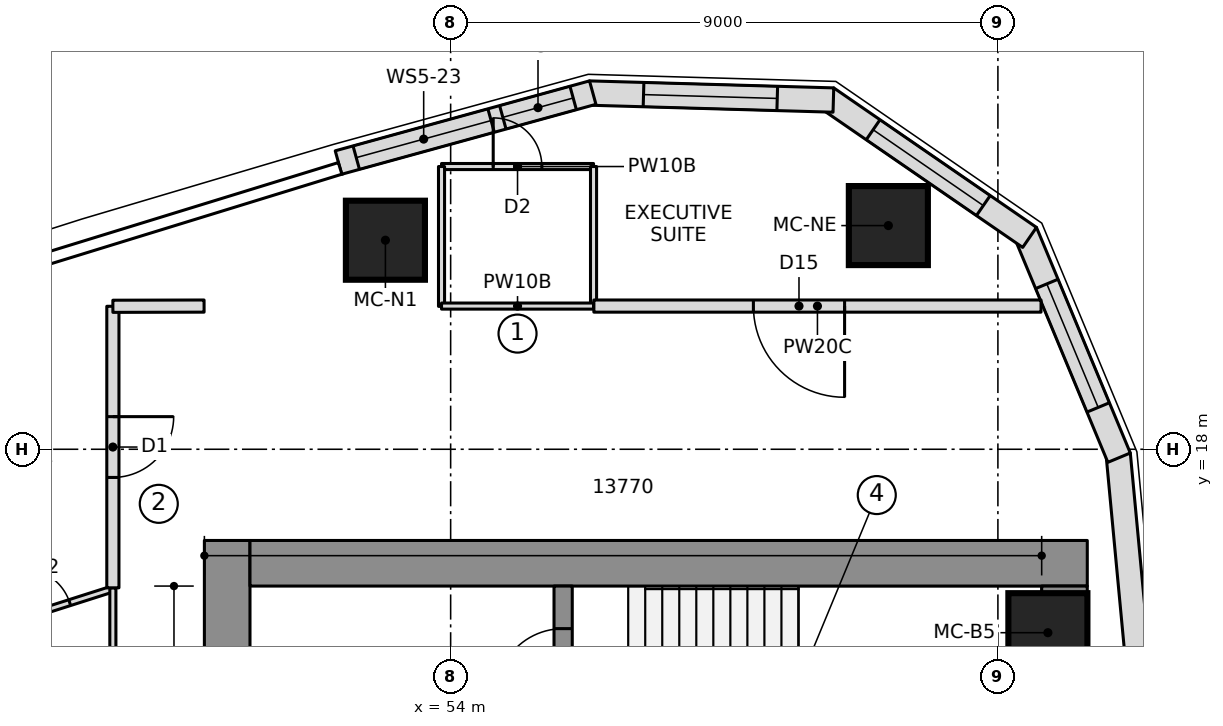
"""IFC4 building model, lengths in metres.
Left out: names, types, materials, properties, quantities, classifications, styles, units other than length and angle.
Written with IfcOpenShell. Run it as: python <this file> out.ifc"""

import sys

from ifc_helpers import new_model, si_unit, direction, frame, frame_2d, origin, origin_2d, place, context, subcontext, project, spatial, polyline, rectangle, outline, extrude, element, fill, save


model = new_model("IFC4")
c1 = context("Model", 3, precision=1e-05, world=origin(), true_north=direction((0.0, 1.0)))
c2 = subcontext(c1, "Body", "Model", "MODEL_VIEW")
j1 = project(units=[si_unit("LENGTHUNIT", "METRE"), si_unit("PLANEANGLEUNIT", "RADIAN")], contexts=[c1])
p1 = place(None, origin())
s1 = spatial("IfcSite", under=j1, at=p1, CompositionType="ELEMENT")
p2 = place(p1, origin())
s2 = spatial("IfcBuilding", under=s1, at=p2, CompositionType="ELEMENT")
p3 = place(p2, frame((0.0, 0.0, 175.5)))
s3 = spatial("IfcBuildingStorey", under=s2, at=p3, CompositionType="ELEMENT", Elevation=175.5)
p4 = place(p3, frame((50.325, 6.65, 0.0), z_axis=(0.0, 0.0, 1.0), x_axis=(0.0, 1.0, 0.0)))
e1 = element("IfcWall", 1, at=p4, inside=s3, PredefinedType="SHEAR", context=c2, shape_type="SweptSolid", body=[
    extrude(rectangle(XDim=9.85, YDim=0.75, at=frame_2d((4.925, 0.0))), origin(), (0.0, 0.0, 1.0), 3.55),
])
p5 = place(p4, frame((6.5, 0.0, 0.0)))
e2 = element("IfcOpeningElement", 2, at=p5, cuts=e1, PredefinedType="OPENING", context=c2, shape_type="SweptSolid", body=[
    extrude(rectangle(XDim=1.1, YDim=2.1, at=frame_2d((0.55, 1.05))), frame((0.0, 0.385, 0.0), z_axis=(0.0, -1.0, 0.0), x_axis=(1.0, 0.0, 0.0)), (0.0, 0.0, 1.0), 0.77),
])
p6 = place(p3, frame((50.7, 16.125, 0.0), z_axis=(0.0, 0.0, 1.0), x_axis=(1.0, 0.0, 0.0)))
e3 = element("IfcWall", 3, at=p6, inside=s3, PredefinedType="SHEAR", context=c2, shape_type="SweptSolid", body=[
    extrude(rectangle(XDim=13.77, YDim=0.75, at=frame_2d((6.885, 0.0))), origin(), (0.0, 0.0, 1.0), 3.55),
])
p7 = place(p3, frame((64.095, 8.099, 0.0), z_axis=(0.0, 0.0, 1.0), x_axis=(0.0, 1.0, 0.0)))
e4 = element("IfcWall", 4, at=p7, inside=s3, PredefinedType="SHEAR", context=c2, shape_type="SweptSolid", body=[
    extrude(rectangle(XDim=7.651, YDim=0.75, at=frame_2d((3.825, 0.0))), origin(), (0.0, 0.0, 1.0), 3.55),
])
p8 = place(p3, frame((55.85, 10.35, 0.0), z_axis=(0.0, 0.0, 1.0), x_axis=(0.0, 1.0, 0.0)))
e5 = element("IfcWall", 5, at=p8, inside=s3, PredefinedType="SHEAR", context=c2, shape_type="SweptSolid", body=[
    extrude(rectangle(XDim=5.4, YDim=0.3, at=frame_2d((2.7, 0.0))), origin(), (0.0, 0.0, 1.0), 3.55),
])
p9 = place(p8, frame((1.43, 0.0, 0.0)))
e6 = element("IfcOpeningElement", 6, at=p9, cuts=e5, PredefinedType="OPENING", context=c2, shape_type="SweptSolid", body=[
    extrude(rectangle(XDim=1.1, YDim=2.1, at=frame_2d((0.55, 1.05))), frame((0.0, 0.16, 0.0), z_axis=(0.0, -1.0, 0.0), x_axis=(1.0, 0.0, 0.0)), (0.0, 0.0, 1.0), 0.32),
])
p10 = place(p8, frame((3.6, 0.0, 0.0)))
e7 = element("IfcOpeningElement", 7, at=p10, cuts=e5, PredefinedType="OPENING", context=c2, shape_type="SweptSolid", body=[
    extrude(rectangle(XDim=1.1, YDim=2.1, at=frame_2d((0.55, 1.05))), frame((0.0, 0.16, 0.0), z_axis=(0.0, -1.0, 0.0), x_axis=(1.0, 0.0, 0.0)), (0.0, 0.0, 1.0), 0.32),
])
for number, where, z_axis, x_axis in (
    (8, (63.822, 14.983, 0.0), (0.0, 0.0, 1.0), (1.0, 0.0, 0.0)),
    (9, (61.198, 21.679, 0.0), (0.0, 0.0, 1.0), (1.0, 0.0, 0.0)),
    (10, (52.927, 21.438, 0.0), (0.0, 0.0, 1.0), (1.0, 0.0, 0.0)),
):
    element("IfcColumn", number, at=place(p3, frame(where, z_axis=z_axis, x_axis=x_axis)), inside=s3, PredefinedType="COLUMN", context=c2, shape_type="SweptSolid", body=[
        extrude(rectangle(XDim=1.3, YDim=1.3, at=origin_2d()), origin(), (0.0, 0.0, 1.0), 3.55),
    ])
p11 = place(p3, frame((65.401, 13.429, 0.0), z_axis=(0.0, 0.0, 1.0), x_axis=(-0.093605694738, 0.995609348044, 0.0)))
e11 = element("IfcWall", 11, at=p11, inside=s3, PredefinedType="NOTDEFINED", context=c2, shape_type="SweptSolid", body=[
    extrude(outline(polyline([(-0.003, -0.2), (4.511, -0.2), (4.451, 0.2), (0.003, 0.2), (-0.003, -0.2)])), origin(), (0.0, 0.0, 1.0), 3.25),
])
p12 = place(p3, frame((64.981, 17.89, 0.0), z_axis=(0.0, 0.0, 1.0), x_axis=(-0.383997619794, 0.923334082547, 0.0)))
e12 = element("IfcWall", 12, at=p12, inside=s3, PredefinedType="NOTDEFINED", context=c2, shape_type="SweptSolid", body=[
    extrude(outline(polyline([(-0.03, -0.2), (3.988, -0.2), (3.87, 0.2), (0.03, 0.2), (-0.03, -0.2)])), origin(), (0.0, 0.0, 1.0), 3.25),
])
p13 = place(p12, frame((0.865, 0.0, 0.6)))
e13 = element("IfcOpeningElement", 13, at=p13, cuts=e12, PredefinedType="OPENING", context=c2, shape_type="SweptSolid", body=[
    extrude(outline(polyline([(0.0, 1.35), (0.084, 1.771), (0.322, 2.128), (0.679, 2.366), (1.1, 2.45), (1.521, 2.366), (1.878, 2.128), (2.116, 1.771), (2.2, 1.35), (2.2, 1.1), (2.116, 0.679), (1.878, 0.322), (1.521, 0.084), (1.1, 0.0), (0.679, 0.084), (0.322, 0.322), (0.084, 0.679), (0.0, 1.1), (0.0, 1.35)])), frame((0.0, 0.21, 0.0), z_axis=(0.0, -1.0, 0.0), x_axis=(1.0, 0.0, 0.0)), (0.0, 0.0, 1.0), 0.42),
])
p14 = place(p3, frame((63.472, 21.518, 0.0), z_axis=(0.0, 0.0, 1.0), x_axis=(-0.823806162588, 0.566871596115, 0.0)))
e14 = element("IfcWall", 14, at=p14, inside=s3, PredefinedType="NOTDEFINED", context=c2, shape_type="SweptSolid", body=[
    extrude(outline(polyline([(-0.059, -0.2), (3.988, -0.2), (3.87, 0.2), (0.059, 0.2), (-0.059, -0.2)])), origin(), (0.0, 0.0, 1.0), 3.25),
])
p15 = place(p14, frame((0.865, 0.0, 0.6)))
e15 = element("IfcOpeningElement", 15, at=p15, cuts=e14, PredefinedType="OPENING", context=c2, shape_type="SweptSolid", body=[
    extrude(outline(polyline([(0.0, 1.35), (0.084, 1.771), (0.322, 2.128), (0.679, 2.366), (1.1, 2.45), (1.521, 2.366), (1.878, 2.128), (2.116, 1.771), (2.2, 1.35), (2.2, 1.1), (2.116, 0.679), (1.878, 0.322), (1.521, 0.084), (1.1, 0.0), (0.679, 0.084), (0.322, 0.322), (0.084, 0.679), (0.0, 1.1), (0.0, 1.35)])), frame((0.0, 0.21, 0.0), z_axis=(0.0, -1.0, 0.0), x_axis=(1.0, 0.0, 0.0)), (0.0, 0.0, 1.0), 0.42),
])
p16 = place(p3, frame((60.236, 23.745, 0.0), z_axis=(0.0, 0.0, 1.0), x_axis=(-0.999587920197, 0.028705222472, 0.0)))
e16 = element("IfcWall", 16, at=p16, inside=s3, PredefinedType="NOTDEFINED", context=c2, shape_type="SweptSolid", body=[
    extrude(outline(polyline([(-0.059, -0.2), (3.959, -0.2), (3.9, 0.2), (0.059, 0.2), (-0.059, -0.2)])), origin(), (0.0, 0.0, 1.0), 3.25),
])
p17 = place(p16, frame((0.865, 0.0, 0.6)))
e17 = element("IfcOpeningElement", 17, at=p17, cuts=e16, PredefinedType="OPENING", context=c2, shape_type="SweptSolid", body=[
    extrude(outline(polyline([(0.0, 1.35), (0.084, 1.771), (0.322, 2.128), (0.679, 2.366), (1.1, 2.45), (1.521, 2.366), (1.878, 2.128), (2.116, 1.771), (2.2, 1.35), (2.2, 1.1), (2.116, 0.679), (1.878, 0.322), (1.521, 0.084), (1.1, 0.0), (0.679, 0.084), (0.322, 0.322), (0.084, 0.679), (0.0, 1.1), (0.0, 1.35)])), frame((0.0, 0.21, 0.0), z_axis=(0.0, -1.0, 0.0), x_axis=(1.0, 0.0, 0.0)), (0.0, 0.0, 1.0), 0.42),
])
p18 = place(p3, frame((56.308, 23.858, 0.0), z_axis=(0.0, 0.0, 1.0), x_axis=(-0.964205755089, -0.265155165617, 0.0)))
e18 = element("IfcWall", 18, at=p18, inside=s3, PredefinedType="NOTDEFINED", context=c2, shape_type="SweptSolid", body=[
    extrude(outline(polyline([(-0.03, -0.2), (4.307, -0.2), (4.307, 0.2), (0.03, 0.2), (-0.03, -0.2)])), origin(), (0.0, 0.0, 1.0), 3.25),
])
p19 = place(p18, frame((0.303, 0.0, 0.9)))
e19 = element("IfcOpeningElement", 19, at=p19, cuts=e18, PredefinedType="OPENING", context=c2, shape_type="SweptSolid", body=[
    extrude(rectangle(XDim=1.2, YDim=1.8, at=frame_2d((0.6, 0.9))), frame((0.0, 0.21, 0.0), z_axis=(0.0, -1.0, 0.0), x_axis=(1.0, 0.0, 0.0)), (0.0, 0.0, 1.0), 0.42),
])
p20 = place(p18, frame((1.704, 0.0, 0.9)))
e20 = element("IfcOpeningElement", 20, at=p20, cuts=e18, PredefinedType="OPENING", context=c2, shape_type="SweptSolid", body=[
    extrude(rectangle(XDim=2.3, YDim=1.8, at=frame_2d((1.15, 0.9))), frame((0.0, 0.21, 0.0), z_axis=(0.0, -1.0, 0.0), x_axis=(1.0, 0.0, 0.0)), (0.0, 0.0, 1.0), 0.42),
])
p21 = place(p3, frame((53.85, 22.65, 0.0), z_axis=(0.0, 0.0, 1.0), x_axis=(1.0, 0.0, 0.0)))
e21 = element("IfcWall", 21, at=p21, inside=s3, PredefinedType="PARTITIONING", context=c2, shape_type="SweptSolid", body=[
    extrude(rectangle(XDim=2.5, YDim=0.1, at=frame_2d((1.25, 0.0))), origin(), (0.0, 0.0, 1.0), 3.25),
])
p22 = place(p21, frame((0.85, 0.0, 0.0)))
e22 = element("IfcOpeningElement", 22, at=p22, cuts=e21, PredefinedType="OPENING", context=c2, shape_type="SweptSolid", body=[
    extrude(rectangle(XDim=0.8, YDim=2.1, at=frame_2d((0.4, 1.05))), frame((0.0, 0.06, 0.0), z_axis=(0.0, -1.0, 0.0), x_axis=(1.0, 0.0, 0.0)), (0.0, 0.0, 1.0), 0.12),
])
for number, where, z_axis, x_axis in (
    (23, (56.35, 22.65, 0.0), (0.0, 0.0, 1.0), (0.0, -1.0, 0.0)),
    (24, (53.85, 20.35, 0.0), (0.0, 0.0, 1.0), (0.0, 1.0, 0.0)),
):
    element("IfcWall", number, at=place(p3, frame(where, z_axis=z_axis, x_axis=x_axis)), inside=s3, PredefinedType="PARTITIONING", context=c2, shape_type="SweptSolid", body=[
        extrude(rectangle(XDim=2.3, YDim=0.1, at=frame_2d((1.15, 0.0))), origin(), (0.0, 0.0, 1.0), 3.25),
    ])
p23 = place(p3, frame((46.259, 15.007, 0.0), z_axis=(0.0, 0.0, 1.0), x_axis=(0.952731222045, 0.303814447552, 0.0)))
e25 = element("IfcWall", 25, at=p23, inside=s3, PredefinedType="PARTITIONING", context=c2, shape_type="SweptSolid", body=[
    extrude(rectangle(XDim=2.277, YDim=0.1, at=frame_2d((1.138, 0.0))), origin(), (0.0, 0.0, 1.0), 3.25),
])
p24 = place(p23, frame((0.75, 0.0, 0.0)))
e26 = element("IfcOpeningElement", 26, at=p24, cuts=e25, PredefinedType="OPENING", context=c2, shape_type="SweptSolid", body=[
    extrude(rectangle(XDim=0.8, YDim=2.1, at=frame_2d((0.4, 1.05))), frame((0.0, 0.06, 0.0), z_axis=(0.0, -1.0, 0.0), x_axis=(1.0, 0.0, 0.0)), (0.0, 0.0, 1.0), 0.12),
])
p25 = place(p3, frame((63.709, 20.355, 0.0), z_axis=(0.0, 0.0, 1.0), x_axis=(-1.0, 0.0, 0.0)))
e27 = element("IfcWall", 27, at=p25, inside=s3, PredefinedType="PARTITIONING", context=c2, shape_type="SweptSolid", body=[
    extrude(rectangle(XDim=7.354, YDim=0.2, at=frame_2d((3.677, 0.0))), origin(), (0.0, 0.0, 1.0), 3.25),
])
p26 = place(p25, frame((3.231, 0.0, 0.0)))
e28 = element("IfcOpeningElement", 28, at=p26, cuts=e27, PredefinedType="OPENING", context=c2, shape_type="SweptSolid", body=[
    extrude(rectangle(XDim=1.5, YDim=2.1, at=frame_2d((0.75, 1.05))), frame((0.0, 0.11, 0.0), z_axis=(0.0, -1.0, 0.0), x_axis=(1.0, 0.0, 0.0)), (0.0, 0.0, 1.0), 0.22),
])
p27 = place(p3, frame((56.35, 20.355, 0.0), z_axis=(0.0, 0.0, 1.0), x_axis=(-1.0, 0.0, 0.0)))
e29 = element("IfcWall", 29, at=p27, inside=s3, PredefinedType="PARTITIONING", context=c2, shape_type="SweptSolid", body=[
    extrude(rectangle(XDim=2.5, YDim=0.1, at=frame_2d((1.25, 0.0))), origin(), (0.0, 0.0, 1.0), 3.25),
])
p28 = place(p3, frame((48.445, 15.721, 0.0), z_axis=(0.0, 0.0, 1.0), x_axis=(0.0, -1.0, 0.0)))
e30 = element("IfcWall", 30, at=p28, inside=s3, PredefinedType="PARTITIONING", context=c2, shape_type="SweptSolid", body=[
    extrude(rectangle(XDim=2.426, YDim=0.1, at=frame_2d((1.213, 0.0))), origin(), (0.0, 0.0, 1.0), 3.25),
])
p29 = place(p3, frame((48.445, 20.352, 0.0), z_axis=(0.0, 0.0, 1.0), x_axis=(-5.2725931e-05, -0.99999999861, 0.0)))
e31 = element("IfcWall", 31, at=p29, inside=s3, PredefinedType="PARTITIONING", context=c2, shape_type="SweptSolid", body=[
    extrude(rectangle(XDim=4.63, YDim=0.2, at=frame_2d((2.315, 0.0))), origin(), (0.0, 0.0, 1.0), 3.25),
])
p30 = place(p29, frame((1.815, 0.0, 0.0)))
e32 = element("IfcOpeningElement", 32, at=p30, cuts=e31, PredefinedType="OPENING", context=c2, shape_type="SweptSolid", body=[
    extrude(rectangle(XDim=1.0, YDim=2.1, at=frame_2d((0.5, 1.05))), frame((0.0, 0.11, 0.0), z_axis=(0.0, -1.0, 0.0), x_axis=(1.0, 0.0, 0.0)), (0.0, 0.0, 1.0), 0.22),
])
p31 = place(p3, frame((49.945, 20.355, 0.0), z_axis=(0.0, 0.0, 1.0), x_axis=(-0.999997403051, -0.002279010849, 0.0)))
e33 = element("IfcWall", 33, at=p31, inside=s3, PredefinedType="PARTITIONING", context=c2, shape_type="SweptSolid", body=[
    extrude(rectangle(XDim=1.5, YDim=0.2, at=frame_2d((0.75, 0.0))), origin(), (0.0, 0.0, 1.0), 3.25),
])
p32 = place(p13, origin())
e34 = element("IfcWindow", 34, at=p32, inside=s3, PartitioningType="SINGLE_PANEL", PredefinedType="WINDOW", context=c2, shape_type="SweptSolid", body=[
    extrude(outline(polyline([(0.0, 1.35), (0.084, 1.771), (0.322, 2.128), (0.679, 2.366), (1.1, 2.45), (1.521, 2.366), (1.878, 2.128), (2.116, 1.771), (2.2, 1.35), (2.2, 1.1), (2.116, 0.679), (1.878, 0.322), (1.521, 0.084), (1.1, 0.0), (0.679, 0.084), (0.322, 0.322), (0.084, 0.679), (0.0, 1.1), (0.0, 1.35)])), frame((0.0, 0.17, 0.0), z_axis=(0.0, -1.0, 0.0), x_axis=(1.0, 0.0, 0.0)), (0.0, 0.0, 1.0), 0.06),
])
fill(e13, e34)
p33 = place(p15, origin())
e35 = element("IfcWindow", 35, at=p33, inside=s3, PartitioningType="SINGLE_PANEL", PredefinedType="WINDOW", context=c2, shape_type="SweptSolid", body=[
    extrude(outline(polyline([(0.0, 1.35), (0.084, 1.771), (0.322, 2.128), (0.679, 2.366), (1.1, 2.45), (1.521, 2.366), (1.878, 2.128), (2.116, 1.771), (2.2, 1.35), (2.2, 1.1), (2.116, 0.679), (1.878, 0.322), (1.521, 0.084), (1.1, 0.0), (0.679, 0.084), (0.322, 0.322), (0.084, 0.679), (0.0, 1.1), (0.0, 1.35)])), frame((0.0, 0.17, 0.0), z_axis=(0.0, -1.0, 0.0), x_axis=(1.0, 0.0, 0.0)), (0.0, 0.0, 1.0), 0.06),
])
fill(e15, e35)
p34 = place(p17, origin())
e36 = element("IfcWindow", 36, at=p34, inside=s3, PartitioningType="SINGLE_PANEL", PredefinedType="WINDOW", context=c2, shape_type="SweptSolid", body=[
    extrude(outline(polyline([(0.0, 1.35), (0.084, 1.771), (0.322, 2.128), (0.679, 2.366), (1.1, 2.45), (1.521, 2.366), (1.878, 2.128), (2.116, 1.771), (2.2, 1.35), (2.2, 1.1), (2.116, 0.679), (1.878, 0.322), (1.521, 0.084), (1.1, 0.0), (0.679, 0.084), (0.322, 0.322), (0.084, 0.679), (0.0, 1.1), (0.0, 1.35)])), frame((0.0, 0.17, 0.0), z_axis=(0.0, -1.0, 0.0), x_axis=(1.0, 0.0, 0.0)), (0.0, 0.0, 1.0), 0.06),
])
fill(e17, e36)
p35 = place(p19, origin())
e37 = element("IfcWindow", 37, at=p35, inside=s3, PartitioningType="SINGLE_PANEL", PredefinedType="WINDOW", context=c2, shape_type="SweptSolid", body=[
    extrude(rectangle(XDim=1.2, YDim=1.8, at=frame_2d((0.6, 0.9))), frame((0.0, 0.17, 0.0), z_axis=(0.0, -1.0, 0.0), x_axis=(1.0, 0.0, 0.0)), (0.0, 0.0, 1.0), 0.06),
])
fill(e19, e37)
p36 = place(p20, origin())
e38 = element("IfcWindow", 38, at=p36, inside=s3, PartitioningType="SINGLE_PANEL", PredefinedType="WINDOW", context=c2, shape_type="SweptSolid", body=[
    extrude(rectangle(XDim=2.3, YDim=1.8, at=frame_2d((1.15, 0.9))), frame((0.0, 0.17, 0.0), z_axis=(0.0, -1.0, 0.0), x_axis=(1.0, 0.0, 0.0)), (0.0, 0.0, 1.0), 0.06),
])
fill(e20, e38)
p37 = place(p22, origin())
e39 = element("IfcDoor", 39, at=p37, inside=s3, OperationType="SINGLE_SWING_LEFT", PredefinedType="DOOR", context=c2, shape_type="SweptSolid", body=[
    extrude(rectangle(XDim=0.8, YDim=2.1, at=frame_2d((0.4, 1.05))), frame((0.0, 0.025, 0.0), z_axis=(0.0, -1.0, 0.0), x_axis=(1.0, 0.0, 0.0)), (0.0, 0.0, 1.0), 0.05),
])
fill(e22, e39)
p38 = place(p24, origin())
e40 = element("IfcDoor", 40, at=p38, inside=s3, OperationType="SINGLE_SWING_LEFT", PredefinedType="DOOR", context=c2, shape_type="SweptSolid", body=[
    extrude(rectangle(XDim=0.8, YDim=2.1, at=frame_2d((0.4, 1.05))), frame((0.0, 0.025, 0.0), z_axis=(0.0, -1.0, 0.0), x_axis=(1.0, 0.0, 0.0)), (0.0, 0.0, 1.0), 0.05),
])
fill(e26, e40)
p39 = place(p26, origin())
e41 = element("IfcDoor", 41, at=p39, inside=s3, OperationType="DOUBLE_DOOR_SINGLE_SWING", PredefinedType="DOOR", context=c2, shape_type="SweptSolid", body=[
    extrude(rectangle(XDim=1.5, YDim=2.1, at=frame_2d((0.75, 1.05))), frame((0.0, 0.025, 0.0), z_axis=(0.0, -1.0, 0.0), x_axis=(1.0, 0.0, 0.0)), (0.0, 0.0, 1.0), 0.05),
])
fill(e28, e41)
p40 = place(p30, origin())
e42 = element("IfcDoor", 42, at=p40, inside=s3, OperationType="SINGLE_SWING_LEFT", PredefinedType="DOOR", context=c2, shape_type="SweptSolid", body=[
    extrude(rectangle(XDim=1.0, YDim=2.1, at=frame_2d((0.5, 1.05))), frame((0.0, 0.025, 0.0), z_axis=(0.0, -1.0, 0.0), x_axis=(1.0, 0.0, 0.0)), (0.0, 0.0, 1.0), 0.05),
])
fill(e32, e42)
p41 = place(p10, origin())
e43 = element("IfcDoor", 43, at=p41, inside=s3, OperationType="SINGLE_SWING_RIGHT", PredefinedType="DOOR", context=c2, shape_type="SweptSolid", body=[
    extrude(rectangle(XDim=1.1, YDim=2.1, at=frame_2d((0.55, 1.05))), frame((0.0, 0.025, 0.0), z_axis=(0.0, -1.0, 0.0), x_axis=(1.0, 0.0, 0.0)), (0.0, 0.0, 1.0), 0.05),
])
fill(e7, e43)
save(model, sys.argv[1])
